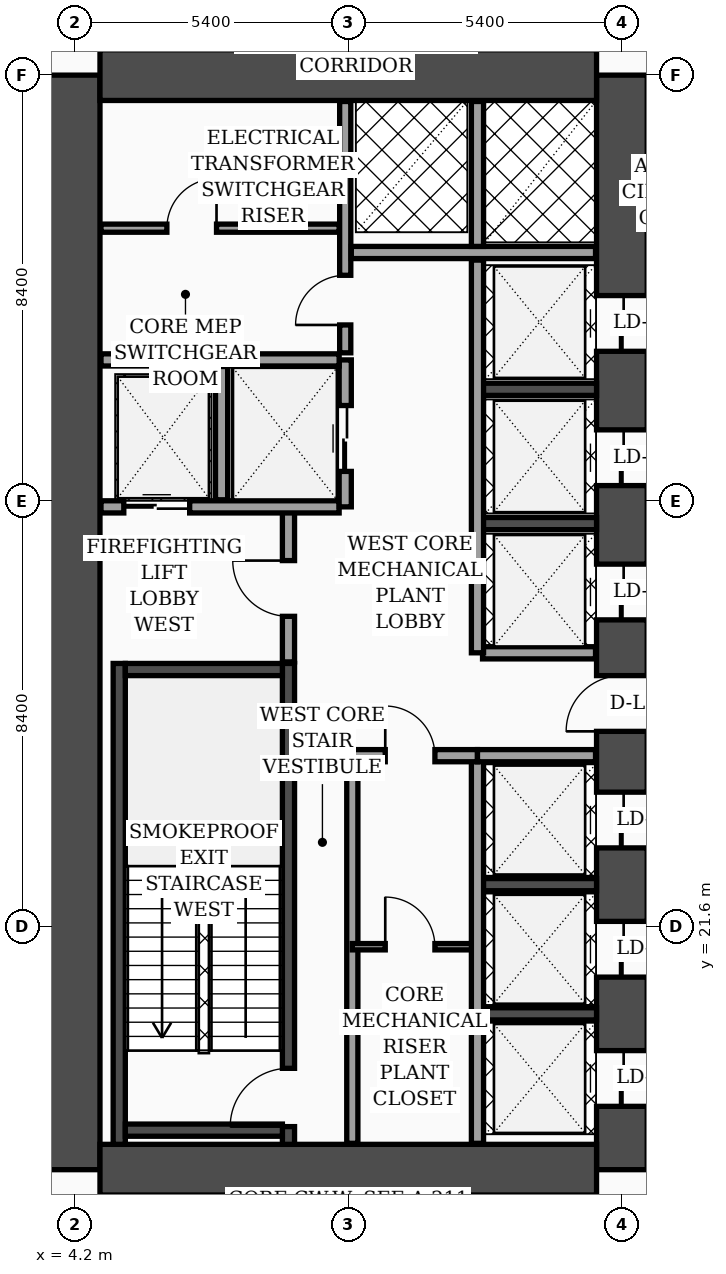
"""IFC4 building model, lengths in metres.
Left out: names, types, materials, properties, quantities, classifications, styles, units other than length and angle.
Written with IfcOpenShell. Run it as: python <this file> out.ifc"""

import sys

from ifc_helpers import new_model, si_unit, direction, frame, frame_2d, origin, place, context, subcontext, project, spatial, rectangle, extrude, element, fill, save


model = new_model("IFC4")
c1 = context("Model", 3, precision=1e-05, world=origin(), true_north=direction((0.0, 1.0)))
c2 = subcontext(c1, "Body", "Model", "MODEL_VIEW")
j1 = project(units=[si_unit("LENGTHUNIT", "METRE"), si_unit("PLANEANGLEUNIT", "RADIAN")], contexts=[c1])
p1 = place(None, origin())
s1 = spatial("IfcSite", under=j1, at=p1, CompositionType="ELEMENT")
p2 = place(p1, origin())
s2 = spatial("IfcBuilding", under=s1, at=p2, CompositionType="ELEMENT")
p3 = place(p2, frame((0.0, 0.0, 92.6)))
s3 = spatial("IfcBuildingStorey", under=s2, at=p3, CompositionType="ELEMENT", Elevation=92.6)
p4 = place(p3, frame((4.2, 16.8, 0.0), z_axis=(0.0, 0.0, 1.0), x_axis=(0.0, 1.0, 0.0)))
e1 = element("IfcWall", 1, at=p4, inside=s3, PredefinedType="SHEAR", context=c2, shape_type="SweptSolid", body=[
    extrude(rectangle(XDim=21.6, YDim=1.0, at=frame_2d((10.8, 0.0))), origin(), (0.0, 0.0, 1.0), 4.35),
])
p5 = place(p3, frame((15.0, 16.8, 0.0), z_axis=(0.0, 0.0, 1.0), x_axis=(0.0, 1.0, 0.0)))
e2 = element("IfcWall", 2, at=p5, inside=s3, PredefinedType="SHEAR", context=c2, shape_type="SweptSolid", body=[
    extrude(rectangle(XDim=21.6, YDim=1.0, at=frame_2d((10.8, 0.0))), origin(), (0.0, 0.0, 1.0), 4.35),
])
p6 = place(p5, frame((8.65, 0.0, 0.0)))
e3 = element("IfcOpeningElement", 3, at=p6, cuts=e2, PredefinedType="OPENING", context=c2, shape_type="SweptSolid", body=[
    extrude(rectangle(XDim=1.1, YDim=2.2, at=frame_2d((0.55, 1.1))), frame((0.0, 0.51, 0.0), z_axis=(0.0, -1.0, 0.0), x_axis=(1.0, 0.0, 0.0)), (0.0, 0.0, 1.0), 1.02),
])
p7 = place(p5, frame((1.25, 0.0, 0.0)))
e4 = element("IfcOpeningElement", 4, at=p7, cuts=e2, PredefinedType="OPENING", context=c2, shape_type="SweptSolid", body=[
    extrude(rectangle(XDim=1.1, YDim=2.2, at=frame_2d((0.55, 1.1))), frame((0.0, 0.51, 0.0), z_axis=(0.0, -1.0, 0.0), x_axis=(1.0, 0.0, 0.0)), (0.0, 0.0, 1.0), 1.02),
])
p8 = place(p5, frame((3.8, 0.0, 0.0)))
e5 = element("IfcOpeningElement", 5, at=p8, cuts=e2, PredefinedType="OPENING", context=c2, shape_type="SweptSolid", body=[
    extrude(rectangle(XDim=1.1, YDim=2.2, at=frame_2d((0.55, 1.1))), frame((0.0, 0.51, 0.0), z_axis=(0.0, -1.0, 0.0), x_axis=(1.0, 0.0, 0.0)), (0.0, 0.0, 1.0), 1.02),
])
p9 = place(p5, frame((6.35, 0.0, 0.0)))
e6 = element("IfcOpeningElement", 6, at=p9, cuts=e2, PredefinedType="OPENING", context=c2, shape_type="SweptSolid", body=[
    extrude(rectangle(XDim=1.1, YDim=2.2, at=frame_2d((0.55, 1.1))), frame((0.0, 0.51, 0.0), z_axis=(0.0, -1.0, 0.0), x_axis=(1.0, 0.0, 0.0)), (0.0, 0.0, 1.0), 1.02),
])
p10 = place(p5, frame((10.85, 0.0, 0.0)))
e7 = element("IfcOpeningElement", 7, at=p10, cuts=e2, PredefinedType="OPENING", context=c2, shape_type="SweptSolid", body=[
    extrude(rectangle(XDim=1.1, YDim=2.2, at=frame_2d((0.55, 1.1))), frame((0.0, 0.51, 0.0), z_axis=(0.0, -1.0, 0.0), x_axis=(1.0, 0.0, 0.0)), (0.0, 0.0, 1.0), 1.02),
])
p11 = place(p5, frame((13.5, 0.0, 0.0)))
e8 = element("IfcOpeningElement", 8, at=p11, cuts=e2, PredefinedType="OPENING", context=c2, shape_type="SweptSolid", body=[
    extrude(rectangle(XDim=1.1, YDim=2.2, at=frame_2d((0.55, 1.1))), frame((0.0, 0.51, 0.0), z_axis=(0.0, -1.0, 0.0), x_axis=(1.0, 0.0, 0.0)), (0.0, 0.0, 1.0), 1.02),
])
p12 = place(p5, frame((16.15, 0.0, 0.0)))
e9 = element("IfcOpeningElement", 9, at=p12, cuts=e2, PredefinedType="OPENING", context=c2, shape_type="SweptSolid", body=[
    extrude(rectangle(XDim=1.1, YDim=2.2, at=frame_2d((0.55, 1.1))), frame((0.0, 0.51, 0.0), z_axis=(0.0, -1.0, 0.0), x_axis=(1.0, 0.0, 0.0)), (0.0, 0.0, 1.0), 1.02),
])
for number, where, z_axis, x_axis in (
    (10, (4.7, 38.4, 0.0), (0.0, 0.0, 1.0), (1.0, 0.0, 0.0)),
    (11, (4.7, 16.8, 0.0), (0.0, 0.0, 1.0), (1.0, 0.0, 0.0)),
):
    element("IfcWall", number, at=place(p3, frame(where, z_axis=z_axis, x_axis=x_axis)), inside=s3, PredefinedType="SHEAR", context=c2, shape_type="SweptSolid", body=[
        extrude(rectangle(XDim=9.8, YDim=1.0, at=frame_2d((4.9, 0.0))), origin(), (0.0, 0.0, 1.0), 4.35),
    ])
p13 = place(p3, frame((5.08, 17.3, 0.0), z_axis=(0.0, 0.0, 1.0), x_axis=(0.0, 1.0, 0.0)))
e12 = element("IfcWall", 12, at=p13, inside=s3, PredefinedType="SOLIDWALL", context=c2, shape_type="SweptSolid", body=[
    extrude(rectangle(XDim=9.49, YDim=0.24, at=frame_2d((4.745, 0.0))), origin(), (0.0, 0.0, 1.0), 4.35),
])
p14 = place(p3, frame((8.42, 17.3, 0.0), z_axis=(0.0, 0.0, 1.0), x_axis=(0.0, 1.0, 0.0)))
e13 = element("IfcWall", 13, at=p14, inside=s3, PredefinedType="SOLIDWALL", context=c2, shape_type="SweptSolid", body=[
    extrude(rectangle(XDim=9.49, YDim=0.24, at=frame_2d((4.745, 0.0))), origin(), (0.0, 0.0, 1.0), 4.35),
])
p15 = place(p14, frame((0.35, 0.0, 0.0)))
e14 = element("IfcOpeningElement", 14, at=p15, cuts=e13, PredefinedType="OPENING", context=c2, shape_type="SweptSolid", body=[
    extrude(rectangle(XDim=1.15, YDim=2.2, at=frame_2d((0.575, 1.1))), frame((0.0, 0.13, 0.0), z_axis=(0.0, -1.0, 0.0), x_axis=(1.0, 0.0, 0.0)), (0.0, 0.0, 1.0), 0.26),
])
for number, where, z_axis, x_axis in (
    (15, (5.2, 17.58, 0.0), (0.0, 0.0, 1.0), (1.0, 0.0, 0.0)),
    (16, (5.2, 26.67, 0.0), (0.0, 0.0, 1.0), (1.0, 0.0, 0.0)),
):
    element("IfcWall", number, at=place(p3, frame(where, z_axis=z_axis, x_axis=x_axis)), inside=s3, PredefinedType="SOLIDWALL", context=c2, shape_type="SweptSolid", body=[
        extrude(rectangle(XDim=3.1, YDim=0.24, at=frame_2d((1.55, 0.0))), origin(), (0.0, 0.0, 1.0), 4.35),
    ])
for number, where, z_axis, x_axis in (
    (17, (12.18, 19.875, 0.0), (0.0, 0.0, 1.0), (1.0, 0.0, 0.0)),
    (18, (12.18, 22.425, 0.0), (0.0, 0.0, 1.0), (1.0, 0.0, 0.0)),
    (19, (12.18, 29.55, 0.0), (0.0, 0.0, 1.0), (1.0, 0.0, 0.0)),
    (20, (12.18, 32.2, 0.0), (0.0, 0.0, 1.0), (1.0, 0.0, 0.0)),
):
    element("IfcWall", number, at=place(p3, frame(where, z_axis=z_axis, x_axis=x_axis)), inside=s3, PredefinedType="SOLIDWALL", context=c2, shape_type="SweptSolid", body=[
        extrude(rectangle(XDim=2.32, YDim=0.24, at=frame_2d((1.16, 0.0))), origin(), (0.0, 0.0, 1.0), 4.35),
    ])
p16 = place(p3, frame((8.42, 26.82, 0.0), z_axis=(0.0, 0.0, 1.0), x_axis=(0.0, 1.0, 0.0)))
e21 = element("IfcWall", 21, at=p16, inside=s3, PredefinedType="SOLIDWALL", context=c2, shape_type="SweptSolid", body=[
    extrude(rectangle(XDim=3.0, YDim=0.24, at=frame_2d((1.5, 0.0))), origin(), (0.0, 0.0, 1.0), 4.35),
])
p17 = place(p16, frame((0.9, 0.0, 0.0)))
e22 = element("IfcOpeningElement", 22, at=p17, cuts=e21, PredefinedType="OPENING", context=c2, shape_type="SweptSolid", body=[
    extrude(rectangle(XDim=1.1, YDim=2.2, at=frame_2d((0.55, 1.1))), frame((0.0, 0.13, 0.0), z_axis=(0.0, -1.0, 0.0), x_axis=(1.0, 0.0, 0.0)), (0.0, 0.0, 1.0), 0.26),
])
p18 = place(p3, frame((4.72, 29.88, 0.0), z_axis=(0.0, 0.0, 1.0), x_axis=(1.0, 0.0, 0.0)))
e23 = element("IfcWall", 23, at=p18, inside=s3, PredefinedType="SOLIDWALL", context=c2, shape_type="SweptSolid", body=[
    extrude(rectangle(XDim=4.7, YDim=0.24, at=frame_2d((2.35, 0.0))), origin(), (0.0, 0.0, 1.0), 4.35),
])
p19 = place(p18, frame((0.45, 0.0, 0.0)))
e24 = element("IfcOpeningElement", 24, at=p19, cuts=e23, PredefinedType="OPENING", context=c2, shape_type="SweptSolid", body=[
    extrude(rectangle(XDim=1.3, YDim=2.35, at=frame_2d((0.65, 1.175))), frame((0.0, 0.13, 0.0), z_axis=(0.0, -1.0, 0.0), x_axis=(1.0, 0.0, 0.0)), (0.0, 0.0, 1.0), 0.26),
])
p20 = place(p3, frame((7.1, 30.02, 0.0), z_axis=(0.0, 0.0, 1.0), x_axis=(0.0, 1.0, 0.0)))
e25 = element("IfcWall", 25, at=p20, inside=s3, PredefinedType="SOLIDWALL", context=c2, shape_type="SweptSolid", body=[
    extrude(rectangle(XDim=2.63, YDim=0.24, at=frame_2d((1.315, 0.0))), origin(), (0.0, 0.0, 1.0), 4.35),
])
p21 = place(p3, frame((9.54, 29.88, 0.0), z_axis=(0.0, 0.0, 1.0), x_axis=(0.0, 1.0, 0.0)))
e26 = element("IfcWall", 26, at=p21, inside=s3, PredefinedType="SOLIDWALL", context=c2, shape_type="SweptSolid", body=[
    extrude(rectangle(XDim=2.9, YDim=0.24, at=frame_2d((1.45, 0.0))), origin(), (0.0, 0.0, 1.0), 4.35),
])
p22 = place(p21, frame((0.7, 0.0, 0.0)))
e27 = element("IfcOpeningElement", 27, at=p22, cuts=e26, PredefinedType="OPENING", context=c2, shape_type="SweptSolid", body=[
    extrude(rectangle(XDim=1.3, YDim=2.35, at=frame_2d((0.65, 1.175))), frame((0.0, 0.13, 0.0), z_axis=(0.0, -1.0, 0.0), x_axis=(1.0, 0.0, 0.0)), (0.0, 0.0, 1.0), 0.26),
])
p23 = place(p3, frame((4.72, 32.78, 0.0), z_axis=(0.0, 0.0, 1.0), x_axis=(1.0, 0.0, 0.0)))
e28 = element("IfcWall", 28, at=p23, inside=s3, PredefinedType="SOLIDWALL", context=c2, shape_type="SweptSolid", body=[
    extrude(rectangle(XDim=4.7, YDim=0.24, at=frame_2d((2.35, 0.0))), origin(), (0.0, 0.0, 1.0), 4.35),
])
p24 = place(p3, frame((9.68, 17.32, 0.0), z_axis=(0.0, 0.0, 1.0), x_axis=(0.0, 1.0, 0.0)))
e29 = element("IfcWall", 29, at=p24, inside=s3, PredefinedType="SOLIDWALL", context=c2, shape_type="SweptSolid", body=[
    extrude(rectangle(XDim=7.68, YDim=0.22, at=frame_2d((3.84, 0.0))), origin(), (0.0, 0.0, 1.0), 4.35),
])
p25 = place(p3, frame((4.72, 35.38, 0.0), z_axis=(0.0, 0.0, 1.0), x_axis=(1.0, 0.0, 0.0)))
e30 = element("IfcWall", 30, at=p25, inside=s3, PredefinedType="PARTITIONING", context=c2, shape_type="SweptSolid", body=[
    extrude(rectangle(XDim=4.7, YDim=0.16, at=frame_2d((2.35, 0.0))), origin(), (0.0, 0.0, 1.0), 4.35),
])
p26 = place(p25, frame((1.3, 0.0, 0.0)))
e31 = element("IfcOpeningElement", 31, at=p26, cuts=e30, PredefinedType="OPENING", context=c2, shape_type="SweptSolid", body=[
    extrude(rectangle(XDim=0.98, YDim=2.15, at=frame_2d((0.49, 1.075))), frame((0.0, 0.09, 0.0), z_axis=(0.0, -1.0, 0.0), x_axis=(1.0, 0.0, 0.0)), (0.0, 0.0, 1.0), 0.18),
])
p27 = place(p3, frame((9.54, 32.92, 0.0), z_axis=(0.0, 0.0, 1.0), x_axis=(0.0, 1.0, 0.0)))
e32 = element("IfcWall", 32, at=p27, inside=s3, PredefinedType="SOLIDWALL", context=c2, shape_type="SweptSolid", body=[
    extrude(rectangle(XDim=4.96, YDim=0.22, at=frame_2d((2.48, 0.0))), origin(), (0.0, 0.0, 1.0), 4.35),
])
p28 = place(p27, frame((0.55, 0.0, 0.0)))
e33 = element("IfcOpeningElement", 33, at=p28, cuts=e32, PredefinedType="OPENING", context=c2, shape_type="SweptSolid", body=[
    extrude(rectangle(XDim=0.98, YDim=2.15, at=frame_2d((0.49, 1.075))), frame((0.0, 0.12, 0.0), z_axis=(0.0, -1.0, 0.0), x_axis=(1.0, 0.0, 0.0)), (0.0, 0.0, 1.0), 0.24),
])
p29 = place(p3, frame((9.68, 21.2, 0.0), z_axis=(0.0, 0.0, 1.0), x_axis=(1.0, 0.0, 0.0)))
e34 = element("IfcWall", 34, at=p29, inside=s3, PredefinedType="PARTITIONING", context=c2, shape_type="SweptSolid", body=[
    extrude(rectangle(XDim=2.47, YDim=0.125, at=frame_2d((1.235, 0.0))), origin(), (0.0, 0.0, 1.0), 4.35),
])
p30 = place(p29, frame((0.65, 0.0, 0.0)))
e35 = element("IfcOpeningElement", 35, at=p30, cuts=e34, PredefinedType="OPENING", context=c2, shape_type="SweptSolid", body=[
    extrude(rectangle(XDim=0.98, YDim=2.15, at=frame_2d((0.49, 1.075))), frame((0.0, 0.073, 0.0), z_axis=(0.0, -1.0, 0.0), x_axis=(1.0, 0.0, 0.0)), (0.0, 0.0, 1.0), 0.145),
])
p31 = place(p3, frame((12.15, 17.32, 0.0), z_axis=(0.0, 0.0, 1.0), x_axis=(0.0, 1.0, 0.0)))
e36 = element("IfcWall", 36, at=p31, inside=s3, PredefinedType="SOLIDWALL", context=c2, shape_type="SweptSolid", body=[
    extrude(rectangle(XDim=7.65, YDim=0.24, at=frame_2d((3.825, 0.0))), origin(), (0.0, 0.0, 1.0), 4.35),
])
p32 = place(p3, frame((9.68, 24.97, 0.0), z_axis=(0.0, 0.0, 1.0), x_axis=(1.0, 0.0, 0.0)))
e37 = element("IfcWall", 37, at=p32, inside=s3, PredefinedType="SOLIDWALL", context=c2, shape_type="SweptSolid", body=[
    extrude(rectangle(XDim=2.47, YDim=0.24, at=frame_2d((1.235, 0.0))), origin(), (0.0, 0.0, 1.0), 4.35),
])
p33 = place(p32, frame((0.65, 0.0, 0.0)))
e38 = element("IfcOpeningElement", 38, at=p33, cuts=e37, PredefinedType="OPENING", context=c2, shape_type="SweptSolid", body=[
    extrude(rectangle(XDim=0.98, YDim=2.15, at=frame_2d((0.49, 1.075))), frame((0.0, 0.13, 0.0), z_axis=(0.0, -1.0, 0.0), x_axis=(1.0, 0.0, 0.0)), (0.0, 0.0, 1.0), 0.26),
])
p34 = place(p3, frame((12.15, 24.97, 0.0), z_axis=(0.0, 0.0, 1.0), x_axis=(1.0, 0.0, 0.0)))
e39 = element("IfcWall", 39, at=p34, inside=s3, PredefinedType="SOLIDWALL", context=c2, shape_type="SweptSolid", body=[
    extrude(rectangle(XDim=2.33, YDim=0.24, at=frame_2d((1.165, 0.0))), origin(), (0.0, 0.0, 1.0), 3.65),
])
p35 = place(p3, frame((12.25, 27.0, 0.0), z_axis=(0.0, 0.0, 1.0), x_axis=(1.0, 0.0, 0.0)))
e40 = element("IfcWall", 40, at=p35, inside=s3, PredefinedType="SOLIDWALL", context=c2, shape_type="SweptSolid", body=[
    extrude(rectangle(XDim=2.23, YDim=0.24, at=frame_2d((1.115, 0.0))), origin(), (0.0, 0.0, 1.0), 4.35),
])
p36 = place(p3, frame((12.15, 27.0, 0.0), z_axis=(0.0, 0.0, 1.0), x_axis=(0.0, 1.0, 0.0)))
e41 = element("IfcWall", 41, at=p36, inside=s3, PredefinedType="SOLIDWALL", context=c2, shape_type="SweptSolid", body=[
    extrude(rectangle(XDim=7.75, YDim=0.24, at=frame_2d((3.875, 0.0))), origin(), (0.0, 0.0, 1.0), 4.35),
])
p37 = place(p3, frame((9.66, 34.9, 0.0), z_axis=(0.0, 0.0, 1.0), x_axis=(1.0, 0.0, 0.0)))
e42 = element("IfcWall", 42, at=p37, inside=s3, PredefinedType="SOLIDWALL", context=c2, shape_type="SweptSolid", body=[
    extrude(rectangle(XDim=4.82, YDim=0.24, at=frame_2d((2.41, 0.0))), origin(), (0.0, 0.0, 1.0), 4.35),
])
p38 = place(p3, frame((12.15, 35.02, 0.0), z_axis=(0.0, 0.0, 1.0), x_axis=(0.0, 1.0, 0.0)))
e43 = element("IfcWall", 43, at=p38, inside=s3, PredefinedType="SOLIDWALL", context=c2, shape_type="SweptSolid", body=[
    extrude(rectangle(XDim=2.86, YDim=0.24, at=frame_2d((1.43, 0.0))), origin(), (0.0, 0.0, 1.0), 4.35),
])
p39 = place(p17, origin())
e44 = element("IfcDoor", 44, at=p39, inside=s3, OperationType="SINGLE_SWING_RIGHT", PredefinedType="DOOR", context=c2, shape_type="SweptSolid", body=[
    extrude(rectangle(XDim=1.1, YDim=2.2, at=frame_2d((0.55, 1.1))), frame((0.0, 0.025, 0.0), z_axis=(0.0, -1.0, 0.0), x_axis=(1.0, 0.0, 0.0)), (0.0, 0.0, 1.0), 0.05),
])
fill(e22, e44)
p40 = place(p19, origin())
e45 = element("IfcDoor", 45, at=p40, inside=s3, OperationType="DOUBLE_DOOR_SLIDING", PredefinedType="DOOR", context=c2, shape_type="SweptSolid", body=[
    extrude(rectangle(XDim=1.3, YDim=2.35, at=frame_2d((0.65, 1.175))), frame((0.0, 0.025, 0.0), z_axis=(0.0, -1.0, 0.0), x_axis=(1.0, 0.0, 0.0)), (0.0, 0.0, 1.0), 0.05),
])
fill(e24, e45)
p41 = place(p22, origin())
e46 = element("IfcDoor", 46, at=p41, inside=s3, OperationType="DOUBLE_DOOR_SLIDING", PredefinedType="DOOR", context=c2, shape_type="SweptSolid", body=[
    extrude(rectangle(XDim=1.3, YDim=2.35, at=frame_2d((0.65, 1.175))), frame((0.0, 0.025, 0.0), z_axis=(0.0, -1.0, 0.0), x_axis=(1.0, 0.0, 0.0)), (0.0, 0.0, 1.0), 0.05),
])
fill(e27, e46)
p42 = place(p26, origin())
e47 = element("IfcDoor", 47, at=p42, inside=s3, OperationType="SINGLE_SWING_RIGHT", PredefinedType="DOOR", context=c2, shape_type="SweptSolid", body=[
    extrude(rectangle(XDim=0.98, YDim=2.15, at=frame_2d((0.49, 1.075))), frame((0.0, 0.025, 0.0), z_axis=(0.0, -1.0, 0.0), x_axis=(1.0, 0.0, 0.0)), (0.0, 0.0, 1.0), 0.05),
])
fill(e31, e47)
p43 = place(p28, origin())
e48 = element("IfcDoor", 48, at=p43, inside=s3, OperationType="SINGLE_SWING_LEFT", PredefinedType="DOOR", context=c2, shape_type="SweptSolid", body=[
    extrude(rectangle(XDim=0.98, YDim=2.15, at=frame_2d((0.49, 1.075))), frame((0.0, 0.025, 0.0), z_axis=(0.0, -1.0, 0.0), x_axis=(1.0, 0.0, 0.0)), (0.0, 0.0, 1.0), 0.05),
])
fill(e33, e48)
p44 = place(p30, origin())
e49 = element("IfcDoor", 49, at=p44, inside=s3, OperationType="SINGLE_SWING_LEFT", PredefinedType="DOOR", context=c2, shape_type="SweptSolid", body=[
    extrude(rectangle(XDim=0.98, YDim=2.15, at=frame_2d((0.49, 1.075))), frame((0.0, 0.025, 0.0), z_axis=(0.0, -1.0, 0.0), x_axis=(1.0, 0.0, 0.0)), (0.0, 0.0, 1.0), 0.05),
])
fill(e35, e49)
p45 = place(p33, origin())
e50 = element("IfcDoor", 50, at=p45, inside=s3, OperationType="SINGLE_SWING_LEFT", PredefinedType="DOOR", context=c2, shape_type="SweptSolid", body=[
    extrude(rectangle(XDim=0.98, YDim=2.15, at=frame_2d((0.49, 1.075))), frame((0.0, 0.025, 0.0), z_axis=(0.0, -1.0, 0.0), x_axis=(1.0, 0.0, 0.0)), (0.0, 0.0, 1.0), 0.05),
])
fill(e38, e50)
p46 = place(p15, origin())
e51 = element("IfcDoor", 51, at=p46, inside=s3, OperationType="SINGLE_SWING_LEFT", PredefinedType="DOOR", context=c2, shape_type="SweptSolid", body=[
    extrude(rectangle(XDim=1.15, YDim=2.2, at=frame_2d((0.575, 1.1))), frame((0.0, 0.025, 0.0), z_axis=(0.0, -1.0, 0.0), x_axis=(1.0, 0.0, 0.0)), (0.0, 0.0, 1.0), 0.05),
])
fill(e14, e51)
p47 = place(p6, origin())
e52 = element("IfcDoor", 52, at=p47, inside=s3, OperationType="SINGLE_SWING_LEFT", PredefinedType="DOOR", context=c2, shape_type="SweptSolid", body=[
    extrude(rectangle(XDim=1.1, YDim=2.2, at=frame_2d((0.55, 1.1))), frame((0.0, 0.025, 0.0), z_axis=(0.0, -1.0, 0.0), x_axis=(1.0, 0.0, 0.0)), (0.0, 0.0, 1.0), 0.05),
])
fill(e3, e52)
p48 = place(p7, origin())
e53 = element("IfcDoor", 53, at=p48, inside=s3, OperationType="DOUBLE_DOOR_SLIDING", PredefinedType="DOOR", context=c2, shape_type="SweptSolid", body=[
    extrude(rectangle(XDim=1.1, YDim=2.2, at=frame_2d((0.55, 1.1))), frame((0.0, 0.025, 0.0), z_axis=(0.0, -1.0, 0.0), x_axis=(1.0, 0.0, 0.0)), (0.0, 0.0, 1.0), 0.05),
])
fill(e4, e53)
p49 = place(p8, origin())
e54 = element("IfcDoor", 54, at=p49, inside=s3, OperationType="DOUBLE_DOOR_SLIDING", PredefinedType="DOOR", context=c2, shape_type="SweptSolid", body=[
    extrude(rectangle(XDim=1.1, YDim=2.2, at=frame_2d((0.55, 1.1))), frame((0.0, 0.025, 0.0), z_axis=(0.0, -1.0, 0.0), x_axis=(1.0, 0.0, 0.0)), (0.0, 0.0, 1.0), 0.05),
])
fill(e5, e54)
p50 = place(p9, origin())
e55 = element("IfcDoor", 55, at=p50, inside=s3, OperationType="DOUBLE_DOOR_SLIDING", PredefinedType="DOOR", context=c2, shape_type="SweptSolid", body=[
    extrude(rectangle(XDim=1.1, YDim=2.2, at=frame_2d((0.55, 1.1))), frame((0.0, 0.025, 0.0), z_axis=(0.0, -1.0, 0.0), x_axis=(1.0, 0.0, 0.0)), (0.0, 0.0, 1.0), 0.05),
])
fill(e6, e55)
p51 = place(p10, origin())
e56 = element("IfcDoor", 56, at=p51, inside=s3, OperationType="DOUBLE_DOOR_SLIDING", PredefinedType="DOOR", context=c2, shape_type="SweptSolid", body=[
    extrude(rectangle(XDim=1.1, YDim=2.2, at=frame_2d((0.55, 1.1))), frame((0.0, 0.025, 0.0), z_axis=(0.0, -1.0, 0.0), x_axis=(1.0, 0.0, 0.0)), (0.0, 0.0, 1.0), 0.05),
])
fill(e7, e56)
p52 = place(p11, origin())
e57 = element("IfcDoor", 57, at=p52, inside=s3, OperationType="DOUBLE_DOOR_SLIDING", PredefinedType="DOOR", context=c2, shape_type="SweptSolid", body=[
    extrude(rectangle(XDim=1.1, YDim=2.2, at=frame_2d((0.55, 1.1))), frame((0.0, 0.025, 0.0), z_axis=(0.0, -1.0, 0.0), x_axis=(1.0, 0.0, 0.0)), (0.0, 0.0, 1.0), 0.05),
])
fill(e8, e57)
p53 = place(p12, origin())
e58 = element("IfcDoor", 58, at=p53, inside=s3, OperationType="DOUBLE_DOOR_SLIDING", PredefinedType="DOOR", context=c2, shape_type="SweptSolid", body=[
    extrude(rectangle(XDim=1.1, YDim=2.2, at=frame_2d((0.55, 1.1))), frame((0.0, 0.025, 0.0), z_axis=(0.0, -1.0, 0.0), x_axis=(1.0, 0.0, 0.0)), (0.0, 0.0, 1.0), 0.05),
])
fill(e9, e58)
save(model, sys.argv[1])
